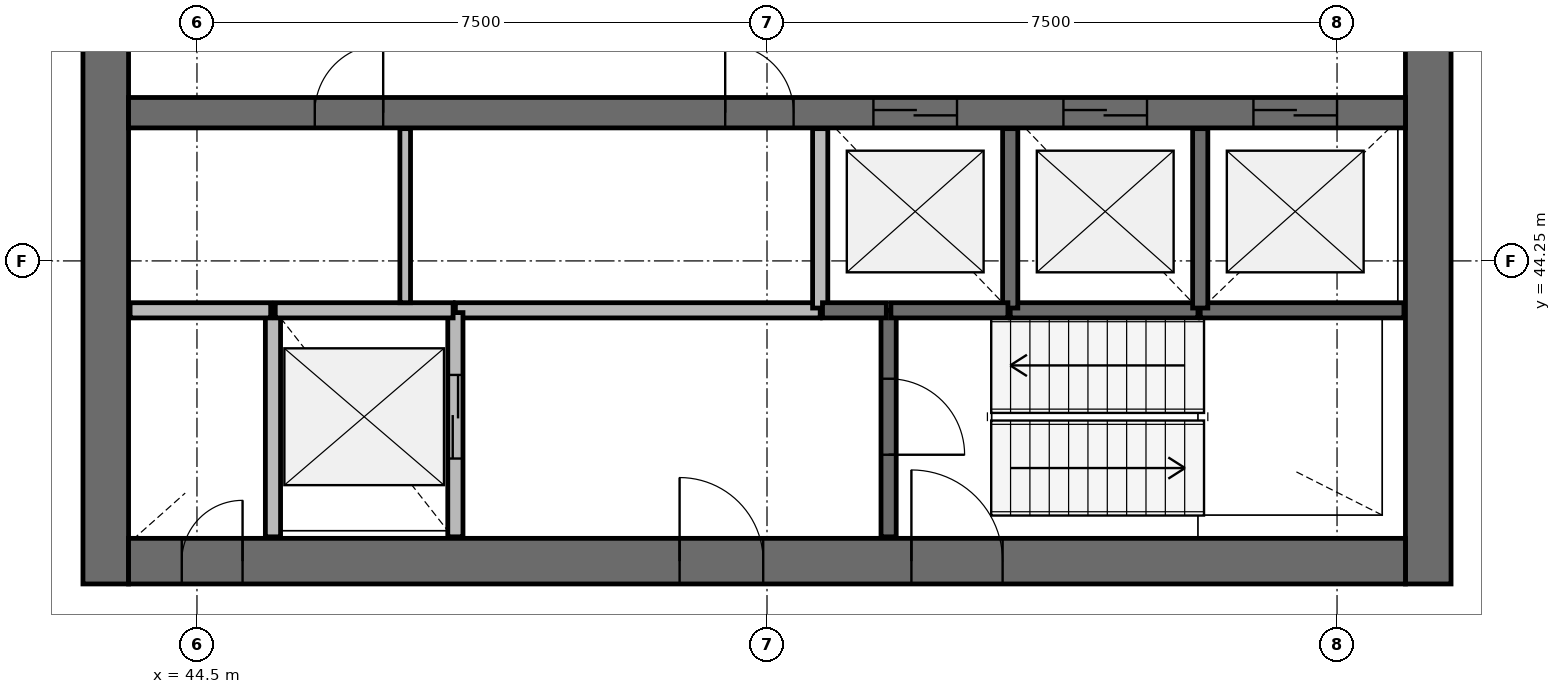
"""IFC4 building model, lengths in metres.
Left out: names, types, materials, properties, quantities, classifications, styles, units other than length and angle.
Written with IfcOpenShell. Run it as: python <this file> out.ifc"""

import sys

from ifc_helpers import new_model, si_unit, direction, frame, frame_2d, origin, place, context, subcontext, project, spatial, rectangle, extrude, source, transform, mapped, element, fill, save


model = new_model("IFC4")
c1 = context("Model", 3, precision=1e-05, world=origin(), true_north=direction((0.0, 1.0)))
c2 = subcontext(c1, "Body", "Model", "MODEL_VIEW")
j1 = project(units=[si_unit("LENGTHUNIT", "METRE"), si_unit("PLANEANGLEUNIT", "RADIAN")], contexts=[c1])
p1 = place(None, origin())
s1 = spatial("IfcSite", under=j1, at=p1, CompositionType="ELEMENT")
p2 = place(p1, origin())
s2 = spatial("IfcBuilding", under=s1, at=p2, CompositionType="ELEMENT")
p3 = place(p2, frame((0.0, 0.0, 250.1)))
s3 = spatial("IfcBuildingStorey", under=s2, at=p3, CompositionType="ELEMENT", Elevation=250.1)
p4 = place(p3, frame((60.7, 40.0, 0.0), z_axis=(0.0, 0.0, 1.0), x_axis=(0.0, 1.0, 0.0)))
e1 = element("IfcWall", 1, at=p4, inside=s3, PredefinedType="SHEAR", context=c2, shape_type="SweptSolid", body=[
    extrude(rectangle(XDim=16.0, YDim=0.6, at=frame_2d((8.0, 0.0))), origin(), (0.0, 0.0, 1.0), 3.9),
])
p5 = place(p4, frame((7.1, 0.0, 0.0)))
e2 = element("IfcOpeningElement", 2, at=p5, cuts=e1, PredefinedType="OPENING", context=c2, shape_type="SweptSolid", body=[
    extrude(rectangle(XDim=1.8, YDim=2.1, at=frame_2d((0.9, 1.05))), frame((0.0, 0.31, 0.0), z_axis=(0.0, -1.0, 0.0), x_axis=(1.0, 0.0, 0.0)), (0.0, 0.0, 1.0), 0.62),
])
p6 = place(p3, frame((43.3, 56.0, 0.0), z_axis=(0.0, 0.0, 1.0), x_axis=(0.0, -1.0, 0.0)))
e3 = element("IfcWall", 3, at=p6, inside=s3, PredefinedType="SHEAR", context=c2, shape_type="SweptSolid", body=[
    extrude(rectangle(XDim=16.0, YDim=0.6, at=frame_2d((8.0, 0.0))), origin(), (0.0, 0.0, 1.0), 3.9),
])
p7 = place(p6, frame((7.1, 0.0, 0.0)))
e4 = element("IfcOpeningElement", 4, at=p7, cuts=e3, PredefinedType="OPENING", context=c2, shape_type="SweptSolid", body=[
    extrude(rectangle(XDim=1.8, YDim=2.1, at=frame_2d((0.9, 1.05))), frame((0.0, 0.31, 0.0), z_axis=(0.0, -1.0, 0.0), x_axis=(1.0, 0.0, 0.0)), (0.0, 0.0, 1.0), 0.62),
])
p8 = place(p3, frame((43.6, 40.3, 0.0), z_axis=(0.0, 0.0, 1.0), x_axis=(1.0, 0.0, 0.0)))
e5 = element("IfcWall", 5, at=p8, inside=s3, PredefinedType="SHEAR", context=c2, shape_type="SweptSolid", body=[
    extrude(rectangle(XDim=16.8, YDim=0.6, at=frame_2d((8.4, 0.0))), origin(), (0.0, 0.0, 1.0), 3.9),
])
p9 = place(p8, frame((10.3, 0.0, 0.0)))
e6 = element("IfcOpeningElement", 6, at=p9, cuts=e5, PredefinedType="OPENING", context=c2, shape_type="SweptSolid", body=[
    extrude(rectangle(XDim=1.2, YDim=2.1, at=frame_2d((0.6, 1.05))), frame((0.0, 0.31, 0.0), z_axis=(0.0, -1.0, 0.0), x_axis=(1.0, 0.0, 0.0)), (0.0, 0.0, 1.0), 0.62),
])
p10 = place(p8, frame((7.25, 0.0, 0.0)))
e7 = element("IfcOpeningElement", 7, at=p10, cuts=e5, PredefinedType="OPENING", context=c2, shape_type="SweptSolid", body=[
    extrude(rectangle(XDim=1.1, YDim=2.1, at=frame_2d((0.55, 1.05))), frame((0.0, 0.31, 0.0), z_axis=(0.0, -1.0, 0.0), x_axis=(1.0, 0.0, 0.0)), (0.0, 0.0, 1.0), 0.62),
])
p11 = place(p8, frame((0.7, 0.0, 0.0)))
e8 = element("IfcOpeningElement", 8, at=p11, cuts=e5, PredefinedType="OPENING", context=c2, shape_type="SweptSolid", body=[
    extrude(rectangle(XDim=0.8, YDim=2.1, at=frame_2d((0.4, 1.05))), frame((0.0, 0.31, 0.0), z_axis=(0.0, -1.0, 0.0), x_axis=(1.0, 0.0, 0.0)), (0.0, 0.0, 1.0), 0.62),
])
p12 = place(p3, frame((43.6, 46.2, 0.0), z_axis=(0.0, 0.0, 1.0), x_axis=(1.0, 0.0, 0.0)))
e9 = element("IfcWall", 9, at=p12, inside=s3, PredefinedType="SHEAR", context=c2, shape_type="SweptSolid", body=[
    extrude(rectangle(XDim=16.8, YDim=0.4, at=frame_2d((8.4, 0.0))), origin(), (0.0, 0.0, 1.0), 3.9),
])
p13 = place(p12, frame((9.8, 0.0, 0.0)))
e10 = element("IfcOpeningElement", 10, at=p13, cuts=e9, PredefinedType="OPENING", context=c2, shape_type="SweptSolid", body=[
    extrude(rectangle(XDim=1.1, YDim=2.1, at=frame_2d((0.55, 1.05))), frame((0.0, 0.21, 0.0), z_axis=(0.0, -1.0, 0.0), x_axis=(1.0, 0.0, 0.0)), (0.0, 0.0, 1.0), 0.42),
])
p14 = place(p12, frame((12.3, 0.0, 0.0)))
e11 = element("IfcOpeningElement", 11, at=p14, cuts=e9, PredefinedType="OPENING", context=c2, shape_type="SweptSolid", body=[
    extrude(rectangle(XDim=1.1, YDim=2.1, at=frame_2d((0.55, 1.05))), frame((0.0, 0.21, 0.0), z_axis=(0.0, -1.0, 0.0), x_axis=(1.0, 0.0, 0.0)), (0.0, 0.0, 1.0), 0.42),
])
p15 = place(p12, frame((14.8, 0.0, 0.0)))
e12 = element("IfcOpeningElement", 12, at=p15, cuts=e9, PredefinedType="OPENING", context=c2, shape_type="SweptSolid", body=[
    extrude(rectangle(XDim=1.1, YDim=2.1, at=frame_2d((0.55, 1.05))), frame((0.0, 0.21, 0.0), z_axis=(0.0, -1.0, 0.0), x_axis=(1.0, 0.0, 0.0)), (0.0, 0.0, 1.0), 0.42),
])
p16 = place(p12, frame((2.45, 0.0, 0.0)))
e13 = element("IfcOpeningElement", 13, at=p16, cuts=e9, PredefinedType="OPENING", context=c2, shape_type="SweptSolid", body=[
    extrude(rectangle(XDim=0.9, YDim=2.1, at=frame_2d((0.45, 1.05))), frame((0.0, 0.21, 0.0), z_axis=(0.0, -1.0, 0.0), x_axis=(1.0, 0.0, 0.0)), (0.0, 0.0, 1.0), 0.42),
])
p17 = place(p12, frame((7.85, 0.0, 0.0)))
e14 = element("IfcOpeningElement", 14, at=p17, cuts=e9, PredefinedType="OPENING", context=c2, shape_type="SweptSolid", body=[
    extrude(rectangle(XDim=0.9, YDim=2.1, at=frame_2d((0.45, 1.05))), frame((0.0, 0.21, 0.0), z_axis=(0.0, -1.0, 0.0), x_axis=(1.0, 0.0, 0.0)), (0.0, 0.0, 1.0), 0.42),
])
p18 = place(p3, frame((52.7, 43.6, 0.0), z_axis=(0.0, 0.0, 1.0), x_axis=(-1.0, 0.0, 0.0)))
e15 = element("IfcWall", 15, at=p18, inside=s3, PredefinedType="SOLIDWALL", context=c2, shape_type="SweptSolid", body=[
    extrude(rectangle(XDim=4.8, YDim=0.2, at=frame_2d((2.4, 0.0))), origin(), (0.0, 0.0, 1.0), 3.58),
])
p19 = place(p3, frame((45.5, 43.6, 0.0), z_axis=(0.0, 0.0, 1.0), x_axis=(0.0, -1.0, 0.0)))
e16 = element("IfcWall", 16, at=p19, inside=s3, PredefinedType="SOLIDWALL", context=c2, shape_type="SweptSolid", body=[
    extrude(rectangle(XDim=2.98, YDim=0.2, at=frame_2d((1.49, 0.0))), origin(), (0.0, 0.0, 1.0), 3.58),
])
p20 = place(p3, frame((47.9, 40.62, 0.0), z_axis=(0.0, 0.0, 1.0), x_axis=(0.0, 1.0, 0.0)))
e17 = element("IfcWall", 17, at=p20, inside=s3, PredefinedType="SOLIDWALL", context=c2, shape_type="SweptSolid", body=[
    extrude(rectangle(XDim=2.95, YDim=0.2, at=frame_2d((1.475, 0.0))), origin(), (0.0, 0.0, 1.0), 3.58),
])
p21 = place(p20, frame((1.03, 0.0, 0.0)))
e18 = element("IfcOpeningElement", 18, at=p21, cuts=e17, PredefinedType="OPENING", context=c2, shape_type="SweptSolid", body=[
    extrude(rectangle(XDim=1.1, YDim=2.1, at=frame_2d((0.55, 1.05))), frame((0.0, 0.11, 0.0), z_axis=(0.0, -1.0, 0.0), x_axis=(1.0, 0.0, 0.0)), (0.0, 0.0, 1.0), 0.22),
])
p22 = place(p3, frame((53.6, 43.6, 0.0), z_axis=(0.0, 0.0, 1.0), x_axis=(0.0, -1.0, 0.0)))
e19 = element("IfcWall", 19, at=p22, inside=s3, PredefinedType="SOLIDWALL", context=c2, shape_type="SweptSolid", body=[
    extrude(rectangle(XDim=2.98, YDim=0.2, at=frame_2d((1.49, 0.0))), origin(), (0.0, 0.0, 1.0), 3.58),
])
p23 = place(p22, frame((0.9, 0.0, 0.0)))
e20 = element("IfcOpeningElement", 20, at=p23, cuts=e19, PredefinedType="OPENING", context=c2, shape_type="SweptSolid", body=[
    extrude(rectangle(XDim=1.0, YDim=2.1, at=frame_2d((0.5, 1.05))), frame((0.0, 0.11, 0.0), z_axis=(0.0, -1.0, 0.0), x_axis=(1.0, 0.0, 0.0)), (0.0, 0.0, 1.0), 0.22),
])
p24 = place(p3, frame((57.7, 43.6, 0.0), z_axis=(0.0, 0.0, 1.0), x_axis=(1.0, 0.0, 0.0)))
e21 = element("IfcWall", 21, at=p24, inside=s3, PredefinedType="SOLIDWALL", context=c2, shape_type="SweptSolid", body=[
    extrude(rectangle(XDim=2.68, YDim=0.2, at=frame_2d((1.34, 0.0))), origin(), (0.0, 0.0, 1.0), 3.58),
])
p25 = place(p3, frame((55.2, 43.6, 0.0), z_axis=(0.0, 0.0, 1.0), x_axis=(1.0, 0.0, 0.0)))
e22 = element("IfcWall", 22, at=p25, inside=s3, PredefinedType="SOLIDWALL", context=c2, shape_type="SweptSolid", body=[
    extrude(rectangle(XDim=2.47, YDim=0.2, at=frame_2d((1.235, 0.0))), origin(), (0.0, 0.0, 1.0), 3.58),
])
p26 = place(p3, frame((47.87, 43.6, 0.0), z_axis=(0.0, 0.0, 1.0), x_axis=(-1.0, 0.0, 0.0)))
e23 = element("IfcWall", 23, at=p26, inside=s3, PredefinedType="SOLIDWALL", context=c2, shape_type="SweptSolid", body=[
    extrude(rectangle(XDim=2.34, YDim=0.2, at=frame_2d((1.17, 0.0))), origin(), (0.0, 0.0, 1.0), 3.58),
])
for number, where, z_axis, x_axis in (
    (24, (52.7, 45.99, 0.0), (0.0, 0.0, 1.0), (0.0, -1.0, 0.0)),
    (25, (55.2, 43.63, 0.0), (0.0, 0.0, 1.0), (0.0, 1.0, 0.0)),
    (26, (57.7, 43.63, 0.0), (0.0, 0.0, 1.0), (0.0, 1.0, 0.0)),
):
    element("IfcWall", number, at=place(p3, frame(where, z_axis=z_axis, x_axis=x_axis)), inside=s3, PredefinedType="SOLIDWALL", context=c2, shape_type="SweptSolid", body=[
        extrude(rectangle(XDim=2.36, YDim=0.2, at=frame_2d((1.18, 0.0))), origin(), (0.0, 0.0, 1.0), 3.58),
    ])
p27 = place(p3, frame((45.47, 43.6, 0.0), z_axis=(0.0, 0.0, 1.0), x_axis=(-1.0, 0.0, 0.0)))
e27 = element("IfcWall", 27, at=p27, inside=s3, PredefinedType="SOLIDWALL", context=c2, shape_type="SweptSolid", body=[
    extrude(rectangle(XDim=1.85, YDim=0.2, at=frame_2d((0.925, 0.0))), origin(), (0.0, 0.0, 1.0), 3.58),
])
p28 = place(p3, frame((53.63, 43.6, 0.0), z_axis=(0.0, 0.0, 1.0), x_axis=(1.0, 0.0, 0.0)))
e28 = element("IfcWall", 28, at=p28, inside=s3, PredefinedType="SOLIDWALL", context=c2, shape_type="SweptSolid", body=[
    extrude(rectangle(XDim=1.54, YDim=0.2, at=frame_2d((0.77, 0.0))), origin(), (0.0, 0.0, 1.0), 3.58),
])
p29 = place(p3, frame((52.73, 43.6, 0.0), z_axis=(0.0, 0.0, 1.0), x_axis=(1.0, 0.0, 0.0)))
e29 = element("IfcWall", 29, at=p29, inside=s3, PredefinedType="SOLIDWALL", context=c2, shape_type="SweptSolid", body=[
    extrude(rectangle(XDim=0.84, YDim=0.2, at=frame_2d((0.42, 0.0))), origin(), (0.0, 0.0, 1.0), 3.58),
])
p30 = place(p3, frame((47.24, 43.7, 0.0), z_axis=(0.0, 0.0, 1.0), x_axis=(0.0, 1.0, 0.0)))
e30 = element("IfcWall", 30, at=p30, inside=s3, PredefinedType="PARTITIONING", context=c2, shape_type="SweptSolid", body=[
    extrude(rectangle(XDim=2.29, YDim=0.14, at=frame_2d((1.145, 0.0))), origin(), (0.0, 0.0, 1.0), 2.88),
])
m1 = source(origin(), c2, "Body", "SweptSolid", [
    extrude(rectangle(XDim=1.1, YDim=2.1, at=frame_2d((0.55, 1.05))), frame((0.0, 0.025, 0.0), z_axis=(0.0, -1.0, 0.0), x_axis=(1.0, 0.0, 0.0)), (0.0, 0.0, 1.0), 0.05),
])
p31 = place(p13, origin())
e31 = element("IfcDoor", 31, at=p31, inside=s3, OperationType="DOUBLE_DOOR_SLIDING", PredefinedType="USERDEFINED", context=c2, shape_type="MappedRepresentation", body=[
    mapped(m1, transform((0.0, 0.0, 0.0), scale=1.0)),
])
fill(e10, e31)
p32 = place(p14, origin())
e32 = element("IfcDoor", 32, at=p32, inside=s3, OperationType="DOUBLE_DOOR_SLIDING", PredefinedType="USERDEFINED", context=c2, shape_type="MappedRepresentation", body=[
    mapped(m1, transform((0.0, 0.0, 0.0), scale=1.0)),
])
fill(e11, e32)
p33 = place(p15, origin())
e33 = element("IfcDoor", 33, at=p33, inside=s3, OperationType="DOUBLE_DOOR_SLIDING", PredefinedType="USERDEFINED", context=c2, shape_type="MappedRepresentation", body=[
    mapped(m1, transform((0.0, 0.0, 0.0), scale=1.0)),
])
fill(e12, e33)
p34 = place(p21, origin())
e34 = element("IfcDoor", 34, at=p34, inside=s3, OperationType="DOUBLE_DOOR_SLIDING", PredefinedType="USERDEFINED", context=c2, shape_type="MappedRepresentation", body=[
    mapped(m1, transform((0.0, 0.0, 0.0), scale=1.0)),
])
fill(e18, e34)
m2 = source(origin(), c2, "Body", "SweptSolid", [
    extrude(rectangle(XDim=1.2, YDim=2.1, at=frame_2d((0.6, 1.05))), frame((0.0, 0.025, 0.0), z_axis=(0.0, -1.0, 0.0), x_axis=(1.0, 0.0, 0.0)), (0.0, 0.0, 1.0), 0.05),
])
p35 = place(p9, origin())
e35 = element("IfcDoor", 35, at=p35, inside=s3, OperationType="SINGLE_SWING_LEFT", PredefinedType="DOOR", context=c2, shape_type="MappedRepresentation", body=[
    mapped(m2, transform((0.0, 0.0, 0.0), scale=1.0)),
])
fill(e6, e35)
m3 = source(origin(), c2, "Body", "SweptSolid", [
    extrude(rectangle(XDim=1.0, YDim=2.1, at=frame_2d((0.5, 1.05))), frame((0.0, 0.025, 0.0), z_axis=(0.0, -1.0, 0.0), x_axis=(1.0, 0.0, 0.0)), (0.0, 0.0, 1.0), 0.05),
])
p36 = place(p23, origin())
e36 = element("IfcDoor", 36, at=p36, inside=s3, OperationType="SINGLE_SWING_RIGHT", PredefinedType="DOOR", context=c2, shape_type="MappedRepresentation", body=[
    mapped(m3, transform((0.0, 0.0, 0.0), scale=1.0)),
])
fill(e20, e36)
m4 = source(origin(), c2, "Body", "SweptSolid", [
    extrude(rectangle(XDim=1.1, YDim=2.1, at=frame_2d((0.55, 1.05))), frame((0.0, 0.025, 0.0), z_axis=(0.0, -1.0, 0.0), x_axis=(1.0, 0.0, 0.0)), (0.0, 0.0, 1.0), 0.05),
])
p37 = place(p10, origin())
e37 = element("IfcDoor", 37, at=p37, inside=s3, OperationType="SINGLE_SWING_LEFT", PredefinedType="DOOR", context=c2, shape_type="MappedRepresentation", body=[
    mapped(m4, transform((0.0, 0.0, 0.0), scale=1.0)),
])
fill(e7, e37)
m5 = source(origin(), c2, "Body", "SweptSolid", [
    extrude(rectangle(XDim=0.8, YDim=2.1, at=frame_2d((0.4, 1.05))), frame((0.0, 0.025, 0.0), z_axis=(0.0, -1.0, 0.0), x_axis=(1.0, 0.0, 0.0)), (0.0, 0.0, 1.0), 0.05),
])
p38 = place(p11, origin())
e38 = element("IfcDoor", 38, at=p38, inside=s3, OperationType="SINGLE_SWING_RIGHT", PredefinedType="DOOR", context=c2, shape_type="MappedRepresentation", body=[
    mapped(m5, transform((0.0, 0.0, 0.0), scale=1.0)),
])
fill(e8, e38)
m6 = source(origin(), c2, "Body", "SweptSolid", [
    extrude(rectangle(XDim=0.9, YDim=2.1, at=frame_2d((0.45, 1.05))), frame((0.0, 0.025, 0.0), z_axis=(0.0, -1.0, 0.0), x_axis=(1.0, 0.0, 0.0)), (0.0, 0.0, 1.0), 0.05),
])
p39 = place(p16, origin())
e39 = element("IfcDoor", 39, at=p39, inside=s3, OperationType="SINGLE_SWING_RIGHT", PredefinedType="DOOR", context=c2, shape_type="MappedRepresentation", body=[
    mapped(m6, transform((0.0, 0.0, 0.0), scale=1.0)),
])
fill(e13, e39)
p40 = place(p17, origin())
e40 = element("IfcDoor", 40, at=p40, inside=s3, OperationType="SINGLE_SWING_LEFT", PredefinedType="DOOR", context=c2, shape_type="MappedRepresentation", body=[
    mapped(m6, transform((0.0, 0.0, 0.0), scale=1.0)),
])
fill(e14, e40)
save(model, sys.argv[1])
